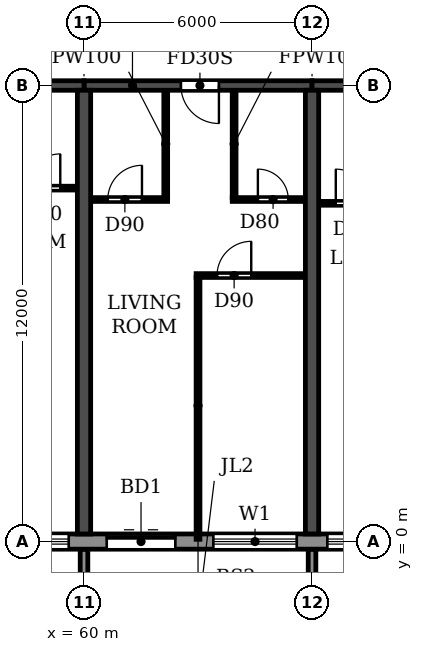
"""IFC4 building model, lengths in metres.
Left out: names, types, materials, properties, quantities, classifications, styles, units other than length and angle.
Written with IfcOpenShell. Run it as: python <this file> out.ifc"""

import sys

from ifc_helpers import new_model, si_unit, direction, frame, frame_2d, origin, place, context, subcontext, project, spatial, polyline, rectangle, outline, extrude, source, transform, mapped, element, fill, save


model = new_model("IFC4")
c1 = context("Model", 3, precision=1e-05, world=origin(), true_north=direction((0.0, 1.0)))
c2 = subcontext(c1, "Body", "Model", "MODEL_VIEW")
j1 = project(units=[si_unit("LENGTHUNIT", "METRE"), si_unit("PLANEANGLEUNIT", "RADIAN")], contexts=[c1])
p1 = place(None, origin())
s1 = spatial("IfcSite", under=j1, at=p1, CompositionType="ELEMENT")
p2 = place(p1, origin())
s2 = spatial("IfcBuilding", under=s1, at=p2, CompositionType="ELEMENT")
p3 = place(p2, frame((0.0, 0.0, 102.6)))
s3 = spatial("IfcBuildingStorey", under=s2, at=p3, CompositionType="ELEMENT", Elevation=102.6)
for number, where, z_axis, x_axis in (
    (1, (60.0, 0.2, 0.0), (0.0, 0.0, 1.0), (0.0, 1.0, 0.0)),
    (2, (66.0, 0.2, 0.0), (0.0, 0.0, 1.0), (0.0, 1.0, 0.0)),
):
    element("IfcWall", number, at=place(p3, frame(where, z_axis=z_axis, x_axis=x_axis)), inside=s3, PredefinedType="SHEAR", context=c2, shape_type="SweptSolid", body=[
        extrude(rectangle(XDim=11.675, YDim=0.35, at=frame_2d((5.837, 0.0))), origin(), (0.0, 0.0, 1.0), 3.0),
    ])
p4 = place(p3, frame((54.0, 12.0, 0.0), z_axis=(0.0, 0.0, 1.0), x_axis=(1.0, 0.0, 0.0)))
e3 = element("IfcWall", 3, at=p4, inside=s3, PredefinedType="SHEAR", context=c2, shape_type="SweptSolid", body=[
    extrude(rectangle(XDim=6.0, YDim=0.25, at=frame_2d((3.0, 0.0))), origin(), (0.0, 0.0, 1.0), 2.4),
])
p5 = place(p4, frame((2.45, 0.0, 0.0)))
e4 = element("IfcOpeningElement", 4, at=p5, cuts=e3, PredefinedType="OPENING", context=c2, shape_type="SweptSolid", body=[
    extrude(rectangle(XDim=1.0, YDim=2.1, at=frame_2d((0.5, 1.05))), frame((0.0, 0.135, 0.0), z_axis=(0.0, -1.0, 0.0), x_axis=(1.0, 0.0, 0.0)), (0.0, 0.0, 1.0), 0.27),
])
p6 = place(p3, frame((60.0, 12.0, 0.0), z_axis=(0.0, 0.0, 1.0), x_axis=(1.0, 0.0, 0.0)))
e5 = element("IfcWall", 5, at=p6, inside=s3, PredefinedType="SHEAR", context=c2, shape_type="SweptSolid", body=[
    extrude(rectangle(XDim=6.0, YDim=0.25, at=frame_2d((3.0, 0.0))), origin(), (0.0, 0.0, 1.0), 2.4),
])
p7 = place(p6, frame((2.55, 0.0, 0.0)))
e6 = element("IfcOpeningElement", 6, at=p7, cuts=e5, PredefinedType="OPENING", context=c2, shape_type="SweptSolid", body=[
    extrude(rectangle(XDim=1.0, YDim=2.1, at=frame_2d((0.5, 1.05))), frame((0.0, 0.135, 0.0), z_axis=(0.0, -1.0, 0.0), x_axis=(1.0, 0.0, 0.0)), (0.0, 0.0, 1.0), 0.27),
])
p8 = place(p3, frame((66.0, 12.0, 0.0), z_axis=(0.0, 0.0, 1.0), x_axis=(1.0, 0.0, 0.0)))
e7 = element("IfcWall", 7, at=p8, inside=s3, PredefinedType="SHEAR", context=c2, shape_type="SweptSolid", body=[
    extrude(rectangle(XDim=6.0, YDim=0.25, at=frame_2d((3.0, 0.0))), origin(), (0.0, 0.0, 1.0), 2.4),
])
p9 = place(p8, frame((2.55, 0.0, 0.0)))
e8 = element("IfcOpeningElement", 8, at=p9, cuts=e7, PredefinedType="OPENING", context=c2, shape_type="SweptSolid", body=[
    extrude(rectangle(XDim=1.0, YDim=2.1, at=frame_2d((0.5, 1.05))), frame((0.0, 0.135, 0.0), z_axis=(0.0, -1.0, 0.0), x_axis=(1.0, 0.0, 0.0)), (0.0, 0.0, 1.0), 0.27),
])
p10 = place(p3, frame((10.683, 0.0, 0.0), z_axis=(0.0, 0.0, 1.0), x_axis=(1.0, 0.0, 0.0)))
e9 = element("IfcWall", 9, at=p10, inside=s3, PredefinedType="STANDARD", context=c2, shape_type="SweptSolid", body=[
    extrude(rectangle(XDim=80.634, YDim=0.4, at=frame_2d((40.317, 0.0))), origin(), (0.0, 0.0, 1.0), 3.0),
])
p11 = place(p10, frame((1.717, 0.0, 0.9)))
e10 = element("IfcOpeningElement", 10, at=p11, cuts=e9, PredefinedType="OPENING", context=c2, shape_type="SweptSolid", body=[
    extrude(rectangle(XDim=2.2, YDim=1.5, at=frame_2d((1.1, 0.75))), frame((0.0, 0.21, 0.0), z_axis=(0.0, -1.0, 0.0), x_axis=(1.0, 0.0, 0.0)), (0.0, 0.0, 1.0), 0.42),
])
p12 = place(p10, frame((4.917, 0.0, 0.0)))
e11 = element("IfcOpeningElement", 11, at=p12, cuts=e9, PredefinedType="OPENING", context=c2, shape_type="SweptSolid", body=[
    extrude(rectangle(XDim=1.8, YDim=2.4, at=frame_2d((0.9, 1.2))), frame((0.0, 0.21, 0.0), z_axis=(0.0, -1.0, 0.0), x_axis=(1.0, 0.0, 0.0)), (0.0, 0.0, 1.0), 0.42),
])
p13 = place(p10, frame((7.717, 0.0, 0.9)))
e12 = element("IfcOpeningElement", 12, at=p13, cuts=e9, PredefinedType="OPENING", context=c2, shape_type="SweptSolid", body=[
    extrude(rectangle(XDim=2.2, YDim=1.5, at=frame_2d((1.1, 0.75))), frame((0.0, 0.21, 0.0), z_axis=(0.0, -1.0, 0.0), x_axis=(1.0, 0.0, 0.0)), (0.0, 0.0, 1.0), 0.42),
])
p14 = place(p10, frame((10.717, 0.0, 0.9)))
e13 = element("IfcOpeningElement", 13, at=p14, cuts=e9, PredefinedType="OPENING", context=c2, shape_type="SweptSolid", body=[
    extrude(rectangle(XDim=2.2, YDim=1.5, at=frame_2d((1.1, 0.75))), frame((0.0, 0.21, 0.0), z_axis=(0.0, -1.0, 0.0), x_axis=(1.0, 0.0, 0.0)), (0.0, 0.0, 1.0), 0.42),
])
p15 = place(p10, frame((13.717, 0.0, 0.9)))
e14 = element("IfcOpeningElement", 14, at=p15, cuts=e9, PredefinedType="OPENING", context=c2, shape_type="SweptSolid", body=[
    extrude(rectangle(XDim=2.2, YDim=1.5, at=frame_2d((1.1, 0.75))), frame((0.0, 0.21, 0.0), z_axis=(0.0, -1.0, 0.0), x_axis=(1.0, 0.0, 0.0)), (0.0, 0.0, 1.0), 0.42),
])
p16 = place(p10, frame((16.717, 0.0, 0.9)))
e15 = element("IfcOpeningElement", 15, at=p16, cuts=e9, PredefinedType="OPENING", context=c2, shape_type="SweptSolid", body=[
    extrude(rectangle(XDim=2.2, YDim=1.5, at=frame_2d((1.1, 0.75))), frame((0.0, 0.21, 0.0), z_axis=(0.0, -1.0, 0.0), x_axis=(1.0, 0.0, 0.0)), (0.0, 0.0, 1.0), 0.42),
])
p17 = place(p10, frame((19.717, 0.0, 0.9)))
e16 = element("IfcOpeningElement", 16, at=p17, cuts=e9, PredefinedType="OPENING", context=c2, shape_type="SweptSolid", body=[
    extrude(rectangle(XDim=2.2, YDim=1.5, at=frame_2d((1.1, 0.75))), frame((0.0, 0.21, 0.0), z_axis=(0.0, -1.0, 0.0), x_axis=(1.0, 0.0, 0.0)), (0.0, 0.0, 1.0), 0.42),
])
p18 = place(p10, frame((22.717, 0.0, 0.9)))
e17 = element("IfcOpeningElement", 17, at=p18, cuts=e9, PredefinedType="OPENING", context=c2, shape_type="SweptSolid", body=[
    extrude(rectangle(XDim=2.2, YDim=1.5, at=frame_2d((1.1, 0.75))), frame((0.0, 0.21, 0.0), z_axis=(0.0, -1.0, 0.0), x_axis=(1.0, 0.0, 0.0)), (0.0, 0.0, 1.0), 0.42),
])
p19 = place(p10, frame((25.717, 0.0, 0.9)))
e18 = element("IfcOpeningElement", 18, at=p19, cuts=e9, PredefinedType="OPENING", context=c2, shape_type="SweptSolid", body=[
    extrude(rectangle(XDim=2.2, YDim=1.5, at=frame_2d((1.1, 0.75))), frame((0.0, 0.21, 0.0), z_axis=(0.0, -1.0, 0.0), x_axis=(1.0, 0.0, 0.0)), (0.0, 0.0, 1.0), 0.42),
])
p20 = place(p10, frame((28.917, 0.0, 0.0)))
e19 = element("IfcOpeningElement", 19, at=p20, cuts=e9, PredefinedType="OPENING", context=c2, shape_type="SweptSolid", body=[
    extrude(rectangle(XDim=1.8, YDim=2.4, at=frame_2d((0.9, 1.2))), frame((0.0, 0.21, 0.0), z_axis=(0.0, -1.0, 0.0), x_axis=(1.0, 0.0, 0.0)), (0.0, 0.0, 1.0), 0.42),
])
p21 = place(p10, frame((31.717, 0.0, 0.9)))
e20 = element("IfcOpeningElement", 20, at=p21, cuts=e9, PredefinedType="OPENING", context=c2, shape_type="SweptSolid", body=[
    extrude(rectangle(XDim=2.2, YDim=1.5, at=frame_2d((1.1, 0.75))), frame((0.0, 0.21, 0.0), z_axis=(0.0, -1.0, 0.0), x_axis=(1.0, 0.0, 0.0)), (0.0, 0.0, 1.0), 0.42),
])
p22 = place(p10, frame((34.717, 0.0, 0.9)))
e21 = element("IfcOpeningElement", 21, at=p22, cuts=e9, PredefinedType="OPENING", context=c2, shape_type="SweptSolid", body=[
    extrude(rectangle(XDim=2.2, YDim=1.5, at=frame_2d((1.1, 0.75))), frame((0.0, 0.21, 0.0), z_axis=(0.0, -1.0, 0.0), x_axis=(1.0, 0.0, 0.0)), (0.0, 0.0, 1.0), 0.42),
])
p23 = place(p10, frame((37.717, 0.0, 0.9)))
e22 = element("IfcOpeningElement", 22, at=p23, cuts=e9, PredefinedType="OPENING", context=c2, shape_type="SweptSolid", body=[
    extrude(rectangle(XDim=2.2, YDim=1.5, at=frame_2d((1.1, 0.75))), frame((0.0, 0.21, 0.0), z_axis=(0.0, -1.0, 0.0), x_axis=(1.0, 0.0, 0.0)), (0.0, 0.0, 1.0), 0.42),
])
p24 = place(p10, frame((40.717, 0.0, 0.9)))
e23 = element("IfcOpeningElement", 23, at=p24, cuts=e9, PredefinedType="OPENING", context=c2, shape_type="SweptSolid", body=[
    extrude(rectangle(XDim=2.2, YDim=1.5, at=frame_2d((1.1, 0.75))), frame((0.0, 0.21, 0.0), z_axis=(0.0, -1.0, 0.0), x_axis=(1.0, 0.0, 0.0)), (0.0, 0.0, 1.0), 0.42),
])
p25 = place(p10, frame((43.717, 0.0, 0.9)))
e24 = element("IfcOpeningElement", 24, at=p25, cuts=e9, PredefinedType="OPENING", context=c2, shape_type="SweptSolid", body=[
    extrude(rectangle(XDim=2.2, YDim=1.5, at=frame_2d((1.1, 0.75))), frame((0.0, 0.21, 0.0), z_axis=(0.0, -1.0, 0.0), x_axis=(1.0, 0.0, 0.0)), (0.0, 0.0, 1.0), 0.42),
])
p26 = place(p10, frame((46.717, 0.0, 0.9)))
e25 = element("IfcOpeningElement", 25, at=p26, cuts=e9, PredefinedType="OPENING", context=c2, shape_type="SweptSolid", body=[
    extrude(rectangle(XDim=2.2, YDim=1.5, at=frame_2d((1.1, 0.75))), frame((0.0, 0.21, 0.0), z_axis=(0.0, -1.0, 0.0), x_axis=(1.0, 0.0, 0.0)), (0.0, 0.0, 1.0), 0.42),
])
p27 = place(p10, frame((49.917, 0.0, 0.0)))
e26 = element("IfcOpeningElement", 26, at=p27, cuts=e9, PredefinedType="OPENING", context=c2, shape_type="SweptSolid", body=[
    extrude(rectangle(XDim=1.8, YDim=2.4, at=frame_2d((0.9, 1.2))), frame((0.0, 0.21, 0.0), z_axis=(0.0, -1.0, 0.0), x_axis=(1.0, 0.0, 0.0)), (0.0, 0.0, 1.0), 0.42),
])
p28 = place(p10, frame((52.717, 0.0, 0.9)))
e27 = element("IfcOpeningElement", 27, at=p28, cuts=e9, PredefinedType="OPENING", context=c2, shape_type="SweptSolid", body=[
    extrude(rectangle(XDim=2.2, YDim=1.5, at=frame_2d((1.1, 0.75))), frame((0.0, 0.21, 0.0), z_axis=(0.0, -1.0, 0.0), x_axis=(1.0, 0.0, 0.0)), (0.0, 0.0, 1.0), 0.42),
])
p29 = place(p10, frame((55.717, 0.0, 0.9)))
e28 = element("IfcOpeningElement", 28, at=p29, cuts=e9, PredefinedType="OPENING", context=c2, shape_type="SweptSolid", body=[
    extrude(rectangle(XDim=2.2, YDim=1.5, at=frame_2d((1.1, 0.75))), frame((0.0, 0.21, 0.0), z_axis=(0.0, -1.0, 0.0), x_axis=(1.0, 0.0, 0.0)), (0.0, 0.0, 1.0), 0.42),
])
p30 = place(p10, frame((58.717, 0.0, 0.9)))
e29 = element("IfcOpeningElement", 29, at=p30, cuts=e9, PredefinedType="OPENING", context=c2, shape_type="SweptSolid", body=[
    extrude(rectangle(XDim=2.2, YDim=1.5, at=frame_2d((1.1, 0.75))), frame((0.0, 0.21, 0.0), z_axis=(0.0, -1.0, 0.0), x_axis=(1.0, 0.0, 0.0)), (0.0, 0.0, 1.0), 0.42),
])
p31 = place(p10, frame((61.717, 0.0, 0.9)))
e30 = element("IfcOpeningElement", 30, at=p31, cuts=e9, PredefinedType="OPENING", context=c2, shape_type="SweptSolid", body=[
    extrude(rectangle(XDim=2.2, YDim=1.5, at=frame_2d((1.1, 0.75))), frame((0.0, 0.21, 0.0), z_axis=(0.0, -1.0, 0.0), x_axis=(1.0, 0.0, 0.0)), (0.0, 0.0, 1.0), 0.42),
])
p32 = place(p10, frame((64.717, 0.0, 0.9)))
e31 = element("IfcOpeningElement", 31, at=p32, cuts=e9, PredefinedType="OPENING", context=c2, shape_type="SweptSolid", body=[
    extrude(rectangle(XDim=2.2, YDim=1.5, at=frame_2d((1.1, 0.75))), frame((0.0, 0.21, 0.0), z_axis=(0.0, -1.0, 0.0), x_axis=(1.0, 0.0, 0.0)), (0.0, 0.0, 1.0), 0.42),
])
p33 = place(p10, frame((67.717, 0.0, 0.9)))
e32 = element("IfcOpeningElement", 32, at=p33, cuts=e9, PredefinedType="OPENING", context=c2, shape_type="SweptSolid", body=[
    extrude(rectangle(XDim=2.2, YDim=1.5, at=frame_2d((1.1, 0.75))), frame((0.0, 0.21, 0.0), z_axis=(0.0, -1.0, 0.0), x_axis=(1.0, 0.0, 0.0)), (0.0, 0.0, 1.0), 0.42),
])
p34 = place(p10, frame((70.717, 0.0, 0.9)))
e33 = element("IfcOpeningElement", 33, at=p34, cuts=e9, PredefinedType="OPENING", context=c2, shape_type="SweptSolid", body=[
    extrude(rectangle(XDim=2.2, YDim=1.5, at=frame_2d((1.1, 0.75))), frame((0.0, 0.21, 0.0), z_axis=(0.0, -1.0, 0.0), x_axis=(1.0, 0.0, 0.0)), (0.0, 0.0, 1.0), 0.42),
])
p35 = place(p10, frame((73.717, 0.0, 0.9)))
e34 = element("IfcOpeningElement", 34, at=p35, cuts=e9, PredefinedType="OPENING", context=c2, shape_type="SweptSolid", body=[
    extrude(rectangle(XDim=2.2, YDim=1.5, at=frame_2d((1.1, 0.75))), frame((0.0, 0.21, 0.0), z_axis=(0.0, -1.0, 0.0), x_axis=(1.0, 0.0, 0.0)), (0.0, 0.0, 1.0), 0.42),
])
p36 = place(p10, frame((76.917, 0.0, 0.0)))
e35 = element("IfcOpeningElement", 35, at=p36, cuts=e9, PredefinedType="OPENING", context=c2, shape_type="SweptSolid", body=[
    extrude(rectangle(XDim=1.8, YDim=2.4, at=frame_2d((0.9, 1.2))), frame((0.0, 0.21, 0.0), z_axis=(0.0, -1.0, 0.0), x_axis=(1.0, 0.0, 0.0)), (0.0, 0.0, 1.0), 0.42),
])
m1 = source(origin(), c2, "Body", "SweptSolid", [
    extrude(outline(polyline([(0.0, 0.0), (0.2, 0.0), (0.2, 1.65), (0.0, 1.65), (0.0, 0.0)])), origin(), (0.0, 0.0, 1.0), 3.1),
])
for number, where in (
    (36, (59.9, -1.85, 0.0)),
    (37, (65.9, -1.85, 0.0)),
):
    element("IfcWall", number, at=place(p3, frame(where)), inside=s3, PredefinedType="STANDARD", context=c2, shape_type="MappedRepresentation", body=[
        mapped(m1, transform((0.0, 0.0, 0.0))),
    ])
p37 = place(p3, frame((62.95, 7.0, 0.0), z_axis=(0.0, 0.0, 1.0), x_axis=(1.0, 0.0, 0.0)))
e38 = element("IfcWall", 38, at=p37, inside=s3, PredefinedType="PARTITIONING", context=c2, shape_type="SweptSolid", body=[
    extrude(rectangle(XDim=2.865, YDim=0.1, at=frame_2d((1.433, 0.0))), origin(), (0.0, 0.0, 1.0), 3.0),
])
p38 = place(p37, frame((0.55, 0.0, 0.0)))
e39 = element("IfcOpeningElement", 39, at=p38, cuts=e38, PredefinedType="OPENING", context=c2, shape_type="SweptSolid", body=[
    extrude(rectangle(XDim=0.9, YDim=2.1, at=frame_2d((0.45, 1.05))), frame((0.0, 0.06, 0.0), z_axis=(0.0, -1.0, 0.0), x_axis=(1.0, 0.0, 0.0)), (0.0, 0.0, 1.0), 0.12),
])
p39 = place(p3, frame((66.185, 8.9, 0.0), z_axis=(0.0, 0.0, 1.0), x_axis=(1.0, 0.0, 0.0)))
e40 = element("IfcWall", 40, at=p39, inside=s3, PredefinedType="PARTITIONING", context=c2, shape_type="SweptSolid", body=[
    extrude(rectangle(XDim=2.015, YDim=0.1, at=frame_2d((1.007, 0.0))), origin(), (0.0, 0.0, 1.0), 3.0),
])
p40 = place(p39, frame((0.44, 0.0, 0.0)))
e41 = element("IfcOpeningElement", 41, at=p40, cuts=e40, PredefinedType="OPENING", context=c2, shape_type="SweptSolid", body=[
    extrude(rectangle(XDim=0.9, YDim=2.1, at=frame_2d((0.45, 1.05))), frame((0.0, 0.06, 0.0), z_axis=(0.0, -1.0, 0.0), x_axis=(1.0, 0.0, 0.0)), (0.0, 0.0, 1.0), 0.12),
])
p41 = place(p3, frame((60.185, 9.0, 0.0), z_axis=(0.0, 0.0, 1.0), x_axis=(1.0, 0.0, 0.0)))
e42 = element("IfcWall", 42, at=p41, inside=s3, PredefinedType="PARTITIONING", context=c2, shape_type="SweptSolid", body=[
    extrude(rectangle(XDim=2.015, YDim=0.1, at=frame_2d((1.007, 0.0))), origin(), (0.0, 0.0, 1.0), 3.0),
])
p42 = place(p41, frame((0.44, 0.0, 0.0)))
e43 = element("IfcOpeningElement", 43, at=p42, cuts=e42, PredefinedType="OPENING", context=c2, shape_type="SweptSolid", body=[
    extrude(rectangle(XDim=0.9, YDim=2.1, at=frame_2d((0.45, 1.05))), frame((0.0, 0.06, 0.0), z_axis=(0.0, -1.0, 0.0), x_axis=(1.0, 0.0, 0.0)), (0.0, 0.0, 1.0), 0.12),
])
p43 = place(p3, frame((63.9, 9.0, 0.0), z_axis=(0.0, 0.0, 1.0), x_axis=(1.0, 0.0, 0.0)))
e44 = element("IfcWall", 44, at=p43, inside=s3, PredefinedType="PARTITIONING", context=c2, shape_type="SweptSolid", body=[
    extrude(rectangle(XDim=1.915, YDim=0.1, at=frame_2d((0.958, 0.0))), origin(), (0.0, 0.0, 1.0), 3.0),
])
p44 = place(p43, frame((0.675, 0.0, 0.0)))
e45 = element("IfcOpeningElement", 45, at=p44, cuts=e44, PredefinedType="OPENING", context=c2, shape_type="SweptSolid", body=[
    extrude(rectangle(XDim=0.8, YDim=2.1, at=frame_2d((0.4, 1.05))), frame((0.0, 0.06, 0.0), z_axis=(0.0, -1.0, 0.0), x_axis=(1.0, 0.0, 0.0)), (0.0, 0.0, 1.0), 0.12),
])
p45 = place(p3, frame((57.8, 9.3, 0.0), z_axis=(0.0, 0.0, 1.0), x_axis=(1.0, 0.0, 0.0)))
e46 = element("IfcWall", 46, at=p45, inside=s3, PredefinedType="PARTITIONING", context=c2, shape_type="SweptSolid", body=[
    extrude(rectangle(XDim=2.015, YDim=0.1, at=frame_2d((1.007, 0.0))), origin(), (0.0, 0.0, 1.0), 3.0),
])
p46 = place(p45, frame((0.675, 0.0, 0.0)))
e47 = element("IfcOpeningElement", 47, at=p46, cuts=e46, PredefinedType="OPENING", context=c2, shape_type="SweptSolid", body=[
    extrude(rectangle(XDim=0.9, YDim=2.1, at=frame_2d((0.45, 1.05))), frame((0.0, 0.06, 0.0), z_axis=(0.0, -1.0, 0.0), x_axis=(1.0, 0.0, 0.0)), (0.0, 0.0, 1.0), 0.12),
])
p47 = place(p3, frame((62.15, 9.05, 0.0), z_axis=(0.0, 0.0, 1.0), x_axis=(0.0, 1.0, 0.0)))
e48 = element("IfcWall", 48, at=p47, inside=s3, PredefinedType="PARTITIONING", context=c2, shape_type="SweptSolid", body=[
    extrude(rectangle(XDim=2.815, YDim=0.1, at=frame_2d((1.407, 0.0))), origin(), (0.0, 0.0, 1.0), 3.0),
])
p48 = place(p3, frame((63.0, 0.06, 0.0), z_axis=(0.0, 0.0, 1.0), x_axis=(0.0, 1.0, 0.0)))
e49 = element("IfcWall", 49, at=p48, inside=s3, PredefinedType="PARTITIONING", context=c2, shape_type="SweptSolid", body=[
    extrude(rectangle(XDim=6.89, YDim=0.1, at=frame_2d((3.445, 0.0))), origin(), (0.0, 0.0, 1.0), 3.0),
])
p49 = place(p3, frame((63.95, 9.05, 0.0), z_axis=(0.0, 0.0, 1.0), x_axis=(0.0, 1.0, 0.0)))
e50 = element("IfcWall", 50, at=p49, inside=s3, PredefinedType="PARTITIONING", context=c2, shape_type="SweptSolid", body=[
    extrude(rectangle(XDim=2.815, YDim=0.1, at=frame_2d((1.407, 0.0))), origin(), (0.0, 0.0, 1.0), 3.0),
])
p50 = place(p26, origin())
e51 = element("IfcWindow", 51, at=p50, inside=s3, PartitioningType="DOUBLE_PANEL_HORIZONTAL", PredefinedType="WINDOW", context=c2, shape_type="SweptSolid", body=[
    extrude(rectangle(XDim=2.2, YDim=1.5, at=frame_2d((1.1, 0.75))), frame((0.0, 0.03, 0.0), z_axis=(0.0, -1.0, 0.0), x_axis=(1.0, 0.0, 0.0)), (0.0, 0.0, 1.0), 0.06),
])
fill(e25, e51)
p51 = place(p27, origin())
e52 = element("IfcDoor", 52, at=p51, inside=s3, OperationType="DOUBLE_DOOR_SLIDING", PredefinedType="DOOR", context=c2, shape_type="SweptSolid", body=[
    extrude(rectangle(XDim=1.8, YDim=2.4, at=frame_2d((0.9, 1.2))), frame((0.0, 0.025, 0.0), z_axis=(0.0, -1.0, 0.0), x_axis=(1.0, 0.0, 0.0)), (0.0, 0.0, 1.0), 0.05),
])
fill(e26, e52)
p52 = place(p28, origin())
e53 = element("IfcWindow", 53, at=p52, inside=s3, PartitioningType="DOUBLE_PANEL_HORIZONTAL", PredefinedType="WINDOW", context=c2, shape_type="SweptSolid", body=[
    extrude(rectangle(XDim=2.2, YDim=1.5, at=frame_2d((1.1, 0.75))), frame((0.0, 0.03, 0.0), z_axis=(0.0, -1.0, 0.0), x_axis=(1.0, 0.0, 0.0)), (0.0, 0.0, 1.0), 0.06),
])
fill(e27, e53)
p53 = place(p29, origin())
e54 = element("IfcWindow", 54, at=p53, inside=s3, PartitioningType="DOUBLE_PANEL_HORIZONTAL", PredefinedType="WINDOW", context=c2, shape_type="SweptSolid", body=[
    extrude(rectangle(XDim=2.2, YDim=1.5, at=frame_2d((1.1, 0.75))), frame((0.0, 0.03, 0.0), z_axis=(0.0, -1.0, 0.0), x_axis=(1.0, 0.0, 0.0)), (0.0, 0.0, 1.0), 0.06),
])
fill(e28, e54)
p54 = place(p46, origin())
e55 = element("IfcDoor", 55, at=p54, inside=s3, OperationType="SINGLE_SWING_RIGHT", PredefinedType="DOOR", context=c2, shape_type="SweptSolid", body=[
    extrude(rectangle(XDim=0.9, YDim=2.1, at=frame_2d((0.45, 1.05))), frame((0.0, 0.025, 0.0), z_axis=(0.0, -1.0, 0.0), x_axis=(1.0, 0.0, 0.0)), (0.0, 0.0, 1.0), 0.05),
])
fill(e47, e55)
p55 = place(p42, origin())
e56 = element("IfcDoor", 56, at=p55, inside=s3, OperationType="SINGLE_SWING_RIGHT", PredefinedType="DOOR", context=c2, shape_type="SweptSolid", body=[
    extrude(rectangle(XDim=0.9, YDim=2.1, at=frame_2d((0.45, 1.05))), frame((0.0, 0.025, 0.0), z_axis=(0.0, -1.0, 0.0), x_axis=(1.0, 0.0, 0.0)), (0.0, 0.0, 1.0), 0.05),
])
fill(e43, e56)
p56 = place(p7, frame((1.0, 0.0, 0.0), z_axis=(0.0, 0.0, 1.0), x_axis=(-1.0, 0.0, 0.0)))
e57 = element("IfcDoor", 57, at=p56, inside=s3, OperationType="SINGLE_SWING_LEFT", PredefinedType="DOOR", context=c2, shape_type="SweptSolid", body=[
    extrude(rectangle(XDim=1.0, YDim=2.1, at=frame_2d((0.5, 1.05))), frame((0.0, 0.025, 0.0), z_axis=(0.0, -1.0, 0.0), x_axis=(1.0, 0.0, 0.0)), (0.0, 0.0, 1.0), 0.05),
])
fill(e6, e57)
p57 = place(p38, origin())
e58 = element("IfcDoor", 58, at=p57, inside=s3, OperationType="SINGLE_SWING_RIGHT", PredefinedType="DOOR", context=c2, shape_type="SweptSolid", body=[
    extrude(rectangle(XDim=0.9, YDim=2.1, at=frame_2d((0.45, 1.05))), frame((0.0, 0.025, 0.0), z_axis=(0.0, -1.0, 0.0), x_axis=(1.0, 0.0, 0.0)), (0.0, 0.0, 1.0), 0.05),
])
fill(e39, e58)
p58 = place(p44, origin())
e59 = element("IfcDoor", 59, at=p58, inside=s3, OperationType="SINGLE_SWING_LEFT", PredefinedType="DOOR", context=c2, shape_type="SweptSolid", body=[
    extrude(rectangle(XDim=0.8, YDim=2.1, at=frame_2d((0.4, 1.05))), frame((0.0, 0.025, 0.0), z_axis=(0.0, -1.0, 0.0), x_axis=(1.0, 0.0, 0.0)), (0.0, 0.0, 1.0), 0.05),
])
fill(e45, e59)
p59 = place(p40, origin())
e60 = element("IfcDoor", 60, at=p59, inside=s3, OperationType="SINGLE_SWING_LEFT", PredefinedType="DOOR", context=c2, shape_type="SweptSolid", body=[
    extrude(rectangle(XDim=0.9, YDim=2.1, at=frame_2d((0.45, 1.05))), frame((0.0, 0.025, 0.0), z_axis=(0.0, -1.0, 0.0), x_axis=(1.0, 0.0, 0.0)), (0.0, 0.0, 1.0), 0.05),
])
fill(e41, e60)
save(model, sys.argv[1])
